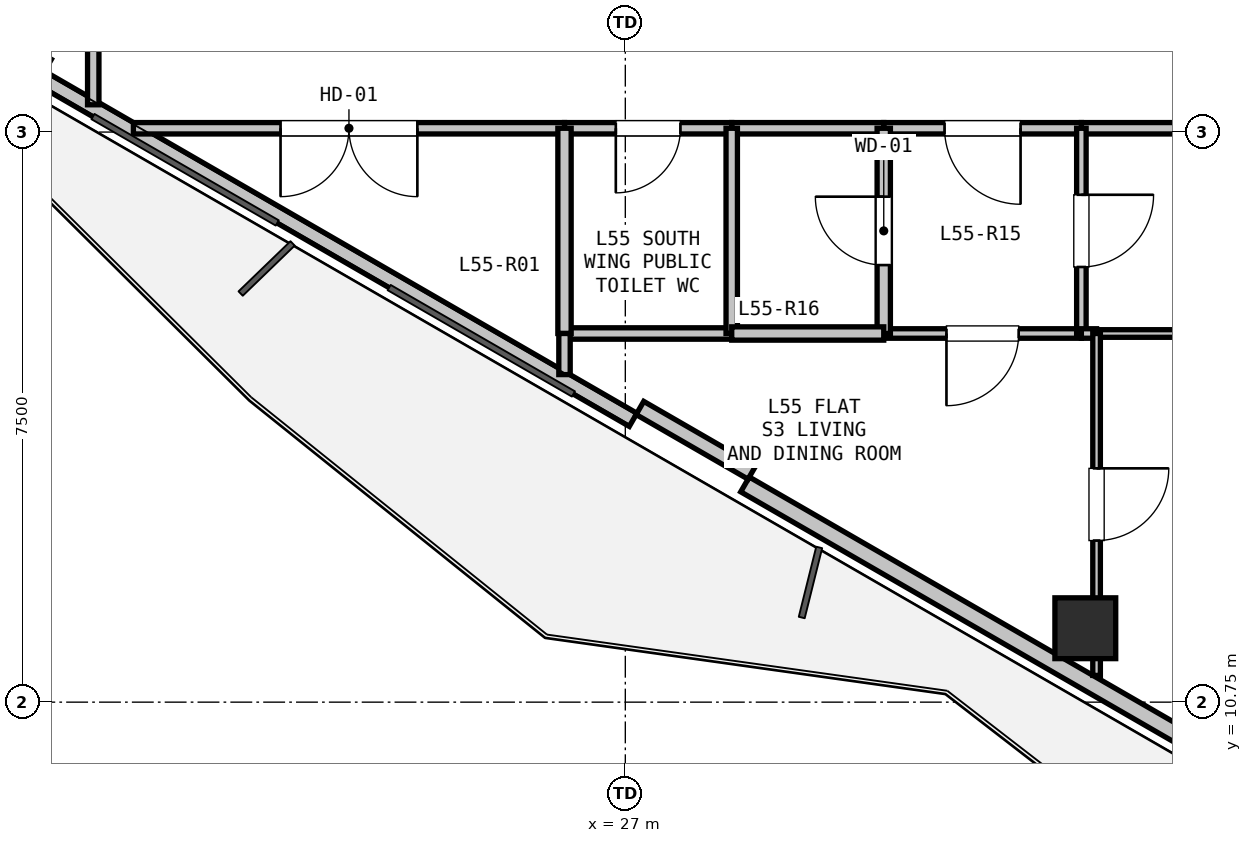
"""IFC4 building model, lengths in metres.
Left out: names, types, materials, properties, quantities, classifications, styles, units other than length and angle.
Written with IfcOpenShell. Run it as: python <this file> out.ifc"""

import sys

from ifc_helpers import new_model, si_unit, direction, frame, frame_2d, origin, origin_2d, place, context, subcontext, project, spatial, rectangle, hollow_rectangle, extrude, element, fill, save


model = new_model("IFC4")
c1 = context("Model", 3, precision=1e-05, world=origin(), true_north=direction((0.0, 1.0)))
c2 = subcontext(c1, "Body", "Model", "MODEL_VIEW")
j1 = project(units=[si_unit("LENGTHUNIT", "METRE"), si_unit("PLANEANGLEUNIT", "RADIAN")], contexts=[c1])
p1 = place(None, origin())
s1 = spatial("IfcSite", under=j1, at=p1, CompositionType="ELEMENT")
p2 = place(p1, origin())
s2 = spatial("IfcBuilding", under=s1, at=p2, CompositionType="ELEMENT")
p3 = place(p2, frame((0.0, 0.0, 198.6)))
s3 = spatial("IfcBuildingStorey", under=s2, at=p3, CompositionType="ELEMENT", Elevation=198.6)
p4 = place(p3, frame((33.052, 11.722, 0.0), z_axis=(0.0, 0.0, 1.0), x_axis=(1.0, 0.0, 0.0)))
e1 = element("IfcColumn", 1, at=p4, inside=s3, PredefinedType="COLUMN", context=c2, shape_type="SweptSolid", body=[
    extrude(hollow_rectangle(XDim=0.8, YDim=0.8, WallThickness=0.025, at=origin_2d()), origin(), (0.0, 0.0, 1.0), 3.3),
])
p5 = place(p3, frame((36.974, 8.765, 0.0), z_axis=(0.0, 0.0, 1.0), x_axis=(-0.866016233231, 0.500015883528, 0.0)))
e2 = element("IfcWall", 2, at=p5, inside=s3, PredefinedType="SOLIDWALL", context=c2, shape_type="SweptSolid", body=[
    extrude(rectangle(XDim=9.699, YDim=0.225, at=frame_2d((4.85, 0.0))), origin(), (0.0, 0.0, 1.0), 2.69),
])
p6 = place(p5, frame((1.73, 0.0, 0.0)))
e3 = element("IfcOpeningElement", 3, at=p6, cuts=e2, PredefinedType="OPENING", context=c2, shape_type="SweptSolid", body=[
    extrude(rectangle(XDim=1.0, YDim=2.1, at=frame_2d((0.5, 1.05))), frame((0.0, 0.123, 0.0), z_axis=(0.0, -1.0, 0.0), x_axis=(1.0, 0.0, 0.0)), (0.0, 0.0, 1.0), 0.245),
])
p7 = place(p3, frame((27.102, 14.464, 0.0), z_axis=(0.0, 0.0, 1.0), x_axis=(-0.866020680503, 0.500008180874, 0.0)))
e4 = element("IfcWall", 4, at=p7, inside=s3, PredefinedType="PARAPET", context=c2, shape_type="SweptSolid", body=[
    extrude(rectangle(XDim=8.999, YDim=0.2, at=frame_2d((4.5, 0.0))), origin(), (0.0, 0.0, 1.0), 0.2),
])
p8 = place(p3, frame((28.665, 13.77, 0.0), z_axis=(0.0, 0.0, 1.0), x_axis=(-0.866025371046, 0.500000056704, 0.0)))
e5 = element("IfcWall", 5, at=p8, inside=s3, PredefinedType="PARAPET", context=c2, shape_type="SweptSolid", body=[
    extrude(rectangle(XDim=1.7, YDim=0.2, at=frame_2d((0.85, 0.0))), origin(), (0.0, 0.0, 1.0), 2.69),
])
p9 = place(p3, frame((39.2, 18.3, 0.0), z_axis=(0.0, 0.0, 1.0), x_axis=(-1.0, 0.0, 0.0)))
e6 = element("IfcWall", 6, at=p9, inside=s3, PredefinedType="PARTITIONING", context=c2, shape_type="SweptSolid", body=[
    extrude(rectangle(XDim=6.2, YDim=0.15, at=frame_2d((3.1, 0.0))), origin(), (0.0, 0.0, 1.0), 2.518),
])
p10 = place(p3, frame((33.0, 18.3, 0.0), z_axis=(0.0, 0.0, 1.0), x_axis=(-1.0, 0.0, 0.0)))
e7 = element("IfcWall", 7, at=p10, inside=s3, PredefinedType="PARTITIONING", context=c2, shape_type="SweptSolid", body=[
    extrude(rectangle(XDim=2.6, YDim=0.15, at=frame_2d((1.3, 0.0))), origin(), (0.0, 0.0, 1.0), 3.07),
])
p11 = place(p10, frame((0.8, 0.0, 0.0)))
e8 = element("IfcOpeningElement", 8, at=p11, cuts=e7, PredefinedType="OPENING", context=c2, shape_type="SweptSolid", body=[
    extrude(rectangle(XDim=1.0, YDim=2.15, at=frame_2d((0.5, 1.075))), frame((0.0, 0.085, 0.0), z_axis=(0.0, -1.0, 0.0), x_axis=(1.0, 0.0, 0.0)), (0.0, 0.0, 1.0), 0.17),
])
p12 = place(p3, frame((30.4, 18.3, 0.0), z_axis=(0.0, 0.0, 1.0), x_axis=(-1.0, 0.0, 0.0)))
e9 = element("IfcWall", 9, at=p12, inside=s3, PredefinedType="PARTITIONING", context=c2, shape_type="SweptSolid", body=[
    extrude(rectangle(XDim=2.0, YDim=0.15, at=frame_2d((1.0, 0.0))), origin(), (0.0, 0.0, 1.0), 3.07),
])
p13 = place(p3, frame((28.4, 18.3, 0.0), z_axis=(0.0, 0.0, 1.0), x_axis=(-1.0, 0.0, 0.0)))
e10 = element("IfcWall", 10, at=p13, inside=s3, PredefinedType="PARTITIONING", context=c2, shape_type="SweptSolid", body=[
    extrude(rectangle(XDim=2.2, YDim=0.15, at=frame_2d((1.1, 0.0))), origin(), (0.0, 0.0, 1.0), 3.07),
])
p14 = place(p13, frame((0.675, 0.0, 0.0)))
e11 = element("IfcOpeningElement", 11, at=p14, cuts=e10, PredefinedType="OPENING", context=c2, shape_type="SweptSolid", body=[
    extrude(rectangle(XDim=0.85, YDim=2.1, at=frame_2d((0.425, 1.05))), frame((0.0, 0.085, 0.0), z_axis=(0.0, -1.0, 0.0), x_axis=(1.0, 0.0, 0.0)), (0.0, 0.0, 1.0), 0.17),
])
p15 = place(p3, frame((26.2, 18.3, 0.0), z_axis=(0.0, 0.0, 1.0), x_axis=(-1.0, 0.0, 0.0)))
e12 = element("IfcWall", 12, at=p15, inside=s3, PredefinedType="PARTITIONING", context=c2, shape_type="SweptSolid", body=[
    extrude(rectangle(XDim=5.672, YDim=0.15, at=frame_2d((2.836, 0.0))), origin(), (0.0, 0.0, 1.0), 2.365),
])
p16 = place(p15, frame((1.936, 0.0, 0.0)))
e13 = element("IfcOpeningElement", 13, at=p16, cuts=e12, PredefinedType="OPENING", context=c2, shape_type="SweptSolid", body=[
    extrude(rectangle(XDim=1.8, YDim=2.2, at=frame_2d((0.9, 1.1))), frame((0.0, 0.085, 0.0), z_axis=(0.0, -1.0, 0.0), x_axis=(1.0, 0.0, 0.0)), (0.0, 0.0, 1.0), 0.17),
])
p17 = place(p3, frame((20.0, 18.609, 0.0), z_axis=(0.0, 0.0, 1.0), x_axis=(0.0, 1.0, 0.0)))
e14 = element("IfcWall", 14, at=p17, inside=s3, PredefinedType="PARTITIONING", context=c2, shape_type="SweptSolid", body=[
    extrude(rectangle(XDim=2.141, YDim=0.15, at=frame_2d((1.071, 0.0))), origin(), (0.0, 0.0, 1.0), 2.365),
])
p18 = place(p3, frame((33.0, 15.6, 0.0), z_axis=(0.0, 0.0, 1.0), x_axis=(-1.0, 0.0, 0.0)))
e15 = element("IfcWall", 15, at=p18, inside=s3, PredefinedType="PARTITIONING", context=c2, shape_type="SweptSolid", body=[
    extrude(rectangle(XDim=2.6, YDim=0.125, at=frame_2d((1.3, 0.0))), origin(), (0.0, 0.0, 1.0), 3.07),
])
p19 = place(p18, frame((0.825, 0.0, 0.0)))
e16 = element("IfcOpeningElement", 16, at=p19, cuts=e15, PredefinedType="OPENING", context=c2, shape_type="SweptSolid", body=[
    extrude(rectangle(XDim=0.95, YDim=2.1, at=frame_2d((0.475, 1.05))), frame((0.0, 0.073, 0.0), z_axis=(0.0, -1.0, 0.0), x_axis=(1.0, 0.0, 0.0)), (0.0, 0.0, 1.0), 0.145),
])
p20 = place(p3, frame((30.4, 15.6, 0.0), z_axis=(0.0, 0.0, 1.0), x_axis=(0.0, 1.0, 0.0)))
e17 = element("IfcWall", 17, at=p20, inside=s3, PredefinedType="PLUMBINGWALL", context=c2, shape_type="SweptSolid", body=[
    extrude(rectangle(XDim=2.7, YDim=0.175, at=frame_2d((1.35, 0.0))), origin(), (0.0, 0.0, 1.0), 3.07),
])
p21 = place(p20, frame((0.9, 0.0, 0.0)))
e18 = element("IfcOpeningElement", 18, at=p21, cuts=e17, PredefinedType="OPENING", context=c2, shape_type="SweptSolid", body=[
    extrude(rectangle(XDim=0.9, YDim=2.1, at=frame_2d((0.45, 1.05))), frame((0.0, 0.097, 0.0), z_axis=(0.0, -1.0, 0.0), x_axis=(1.0, 0.0, 0.0)), (0.0, 0.0, 1.0), 0.195),
])
p22 = place(p3, frame((33.0, 18.3, 0.0), z_axis=(0.0, 0.0, 1.0), x_axis=(0.0, -1.0, 0.0)))
e19 = element("IfcWall", 19, at=p22, inside=s3, PredefinedType="PARTITIONING", context=c2, shape_type="SweptSolid", body=[
    extrude(rectangle(XDim=2.7, YDim=0.125, at=frame_2d((1.35, 0.0))), origin(), (0.0, 0.0, 1.0), 3.07),
])
p23 = place(p22, frame((0.875, 0.0, 0.0)))
e20 = element("IfcOpeningElement", 20, at=p23, cuts=e19, PredefinedType="OPENING", context=c2, shape_type="SweptSolid", body=[
    extrude(rectangle(XDim=0.95, YDim=2.1, at=frame_2d((0.475, 1.05))), frame((0.0, 0.073, 0.0), z_axis=(0.0, -1.0, 0.0), x_axis=(1.0, 0.0, 0.0)), (0.0, 0.0, 1.0), 0.145),
])
p24 = place(p3, frame((28.4, 15.6, 0.0), z_axis=(0.0, 0.0, 1.0), x_axis=(-1.0, 0.0, 0.0)))
e21 = element("IfcWall", 21, at=p24, inside=s3, PredefinedType="PARTITIONING", context=c2, shape_type="SweptSolid", body=[
    extrude(rectangle(XDim=2.2, YDim=0.15, at=frame_2d((1.1, 0.0))), origin(), (0.0, 0.0, 1.0), 2.365),
])
p25 = place(p3, frame((26.2, 15.6, 0.0), z_axis=(0.0, 0.0, 1.0), x_axis=(0.0, 1.0, 0.0)))
e22 = element("IfcWall", 22, at=p25, inside=s3, PredefinedType="PLUMBINGWALL", context=c2, shape_type="SweptSolid", body=[
    extrude(rectangle(XDim=2.7, YDim=0.175, at=frame_2d((1.35, 0.0))), origin(), (0.0, 0.0, 1.0), 2.365),
])
p26 = place(p3, frame((28.4, 18.3, 0.0), z_axis=(0.0, 0.0, 1.0), x_axis=(0.0, -1.0, 0.0)))
e23 = element("IfcWall", 23, at=p26, inside=s3, PredefinedType="PARTITIONING", context=c2, shape_type="SweptSolid", body=[
    extrude(rectangle(XDim=2.7, YDim=0.15, at=frame_2d((1.35, 0.0))), origin(), (0.0, 0.0, 1.0), 3.07),
])
p27 = place(p3, frame((30.4, 15.6, 0.0), z_axis=(0.0, 0.0, 1.0), x_axis=(-1.0, 0.0, 0.0)))
e24 = element("IfcWall", 24, at=p27, inside=s3, PredefinedType="PLUMBINGWALL", context=c2, shape_type="SweptSolid", body=[
    extrude(rectangle(XDim=2.0, YDim=0.175, at=frame_2d((1.0, 0.0))), origin(), (0.0, 0.0, 1.0), 3.07),
])
p28 = place(p3, frame((36.89, 15.6, 0.0), z_axis=(0.0, 0.0, 1.0), x_axis=(-1.0, 0.0, 0.0)))
e25 = element("IfcWall", 25, at=p28, inside=s3, PredefinedType="PARTITIONING", context=c2, shape_type="SweptSolid", body=[
    extrude(rectangle(XDim=3.69, YDim=0.1, at=frame_2d((1.845, 0.0))), origin(), (0.0, 0.0, 1.0), 3.07),
])
p29 = place(p3, frame((33.2, 15.6, 0.0), z_axis=(0.0, 0.0, 1.0), x_axis=(-1.0, 0.0, 0.0)))
e26 = element("IfcWall", 26, at=p29, inside=s3, PredefinedType="PARTITIONING", context=c2, shape_type="SweptSolid", body=[
    extrude(rectangle(XDim=0.2, YDim=0.125, at=frame_2d((0.1, 0.0))), origin(), (0.0, 0.0, 1.0), 3.07),
])
p30 = place(p3, frame((26.2, 15.6, 0.0), z_axis=(0.0, 0.0, 1.0), x_axis=(0.0, -1.0, 0.0)))
e27 = element("IfcWall", 27, at=p30, inside=s3, PredefinedType="PARTITIONING", context=c2, shape_type="SweptSolid", body=[
    extrude(rectangle(XDim=0.541, YDim=0.15, at=frame_2d((0.271, 0.0))), origin(), (0.0, 0.0, 1.0), 2.365),
])
p31 = place(p3, frame((33.2, 15.6, 0.0), z_axis=(0.0, 0.0, 1.0), x_axis=(0.0, -1.0, 0.0)))
e28 = element("IfcWall", 28, at=p31, inside=s3, PredefinedType="PARTITIONING", context=c2, shape_type="SweptSolid", body=[
    extrude(rectangle(XDim=4.499, YDim=0.1, at=frame_2d((2.249, 0.0))), origin(), (0.0, 0.0, 1.0), 3.07),
])
p32 = place(p31, frame((1.774, 0.0, 0.0)))
e29 = element("IfcOpeningElement", 29, at=p32, cuts=e28, PredefinedType="OPENING", context=c2, shape_type="SweptSolid", body=[
    extrude(rectangle(XDim=0.95, YDim=2.1, at=frame_2d((0.475, 1.05))), frame((0.0, 0.06, 0.0), z_axis=(0.0, -1.0, 0.0), x_axis=(1.0, 0.0, 0.0)), (0.0, 0.0, 1.0), 0.12),
])
p33 = place(p11, origin())
e30 = element("IfcDoor", 30, at=p33, inside=s3, OperationType="SINGLE_SWING_LEFT", PredefinedType="DOOR", context=c2, shape_type="SweptSolid", body=[
    extrude(rectangle(XDim=1.0, YDim=2.15, at=frame_2d((0.5, 1.075))), frame((0.0, 0.025, 0.0), z_axis=(0.0, -1.0, 0.0), x_axis=(1.0, 0.0, 0.0)), (0.0, 0.0, 1.0), 0.05),
])
fill(e8, e30)
p34 = place(p14, origin())
e31 = element("IfcDoor", 31, at=p34, inside=s3, OperationType="SINGLE_SWING_RIGHT", PredefinedType="DOOR", context=c2, shape_type="SweptSolid", body=[
    extrude(rectangle(XDim=0.85, YDim=2.1, at=frame_2d((0.425, 1.05))), frame((0.0, 0.025, 0.0), z_axis=(0.0, -1.0, 0.0), x_axis=(1.0, 0.0, 0.0)), (0.0, 0.0, 1.0), 0.05),
])
fill(e11, e31)
p35 = place(p16, origin())
e32 = element("IfcDoor", 32, at=p35, inside=s3, OperationType="DOUBLE_DOOR_SINGLE_SWING", PredefinedType="DOOR", context=c2, shape_type="SweptSolid", body=[
    extrude(rectangle(XDim=1.8, YDim=2.2, at=frame_2d((0.9, 1.1))), frame((0.0, 0.025, 0.0), z_axis=(0.0, -1.0, 0.0), x_axis=(1.0, 0.0, 0.0)), (0.0, 0.0, 1.0), 0.05),
])
fill(e13, e32)
p36 = place(p21, origin())
e33 = element("IfcDoor", 33, at=p36, inside=s3, OperationType="SINGLE_SWING_RIGHT", PredefinedType="DOOR", context=c2, shape_type="SweptSolid", body=[
    extrude(rectangle(XDim=0.9, YDim=2.1, at=frame_2d((0.45, 1.05))), frame((0.0, 0.025, 0.0), z_axis=(0.0, -1.0, 0.0), x_axis=(1.0, 0.0, 0.0)), (0.0, 0.0, 1.0), 0.05),
])
fill(e18, e33)
p37 = place(p23, origin())
e34 = element("IfcDoor", 34, at=p37, inside=s3, OperationType="SINGLE_SWING_LEFT", PredefinedType="DOOR", context=c2, shape_type="SweptSolid", body=[
    extrude(rectangle(XDim=0.95, YDim=2.1, at=frame_2d((0.475, 1.05))), frame((0.0, 0.025, 0.0), z_axis=(0.0, -1.0, 0.0), x_axis=(1.0, 0.0, 0.0)), (0.0, 0.0, 1.0), 0.05),
])
fill(e20, e34)
p38 = place(p19, origin())
e35 = element("IfcDoor", 35, at=p38, inside=s3, OperationType="SINGLE_SWING_RIGHT", PredefinedType="DOOR", context=c2, shape_type="SweptSolid", body=[
    extrude(rectangle(XDim=0.95, YDim=2.1, at=frame_2d((0.475, 1.05))), frame((0.0, 0.025, 0.0), z_axis=(0.0, -1.0, 0.0), x_axis=(1.0, 0.0, 0.0)), (0.0, 0.0, 1.0), 0.05),
])
fill(e16, e35)
p39 = place(p32, origin())
e36 = element("IfcDoor", 36, at=p39, inside=s3, OperationType="SINGLE_SWING_LEFT", PredefinedType="DOOR", context=c2, shape_type="SweptSolid", body=[
    extrude(rectangle(XDim=0.95, YDim=2.1, at=frame_2d((0.475, 1.05))), frame((0.0, 0.025, 0.0), z_axis=(0.0, -1.0, 0.0), x_axis=(1.0, 0.0, 0.0)), (0.0, 0.0, 1.0), 0.05),
])
fill(e29, e36)
save(model, sys.argv[1])
